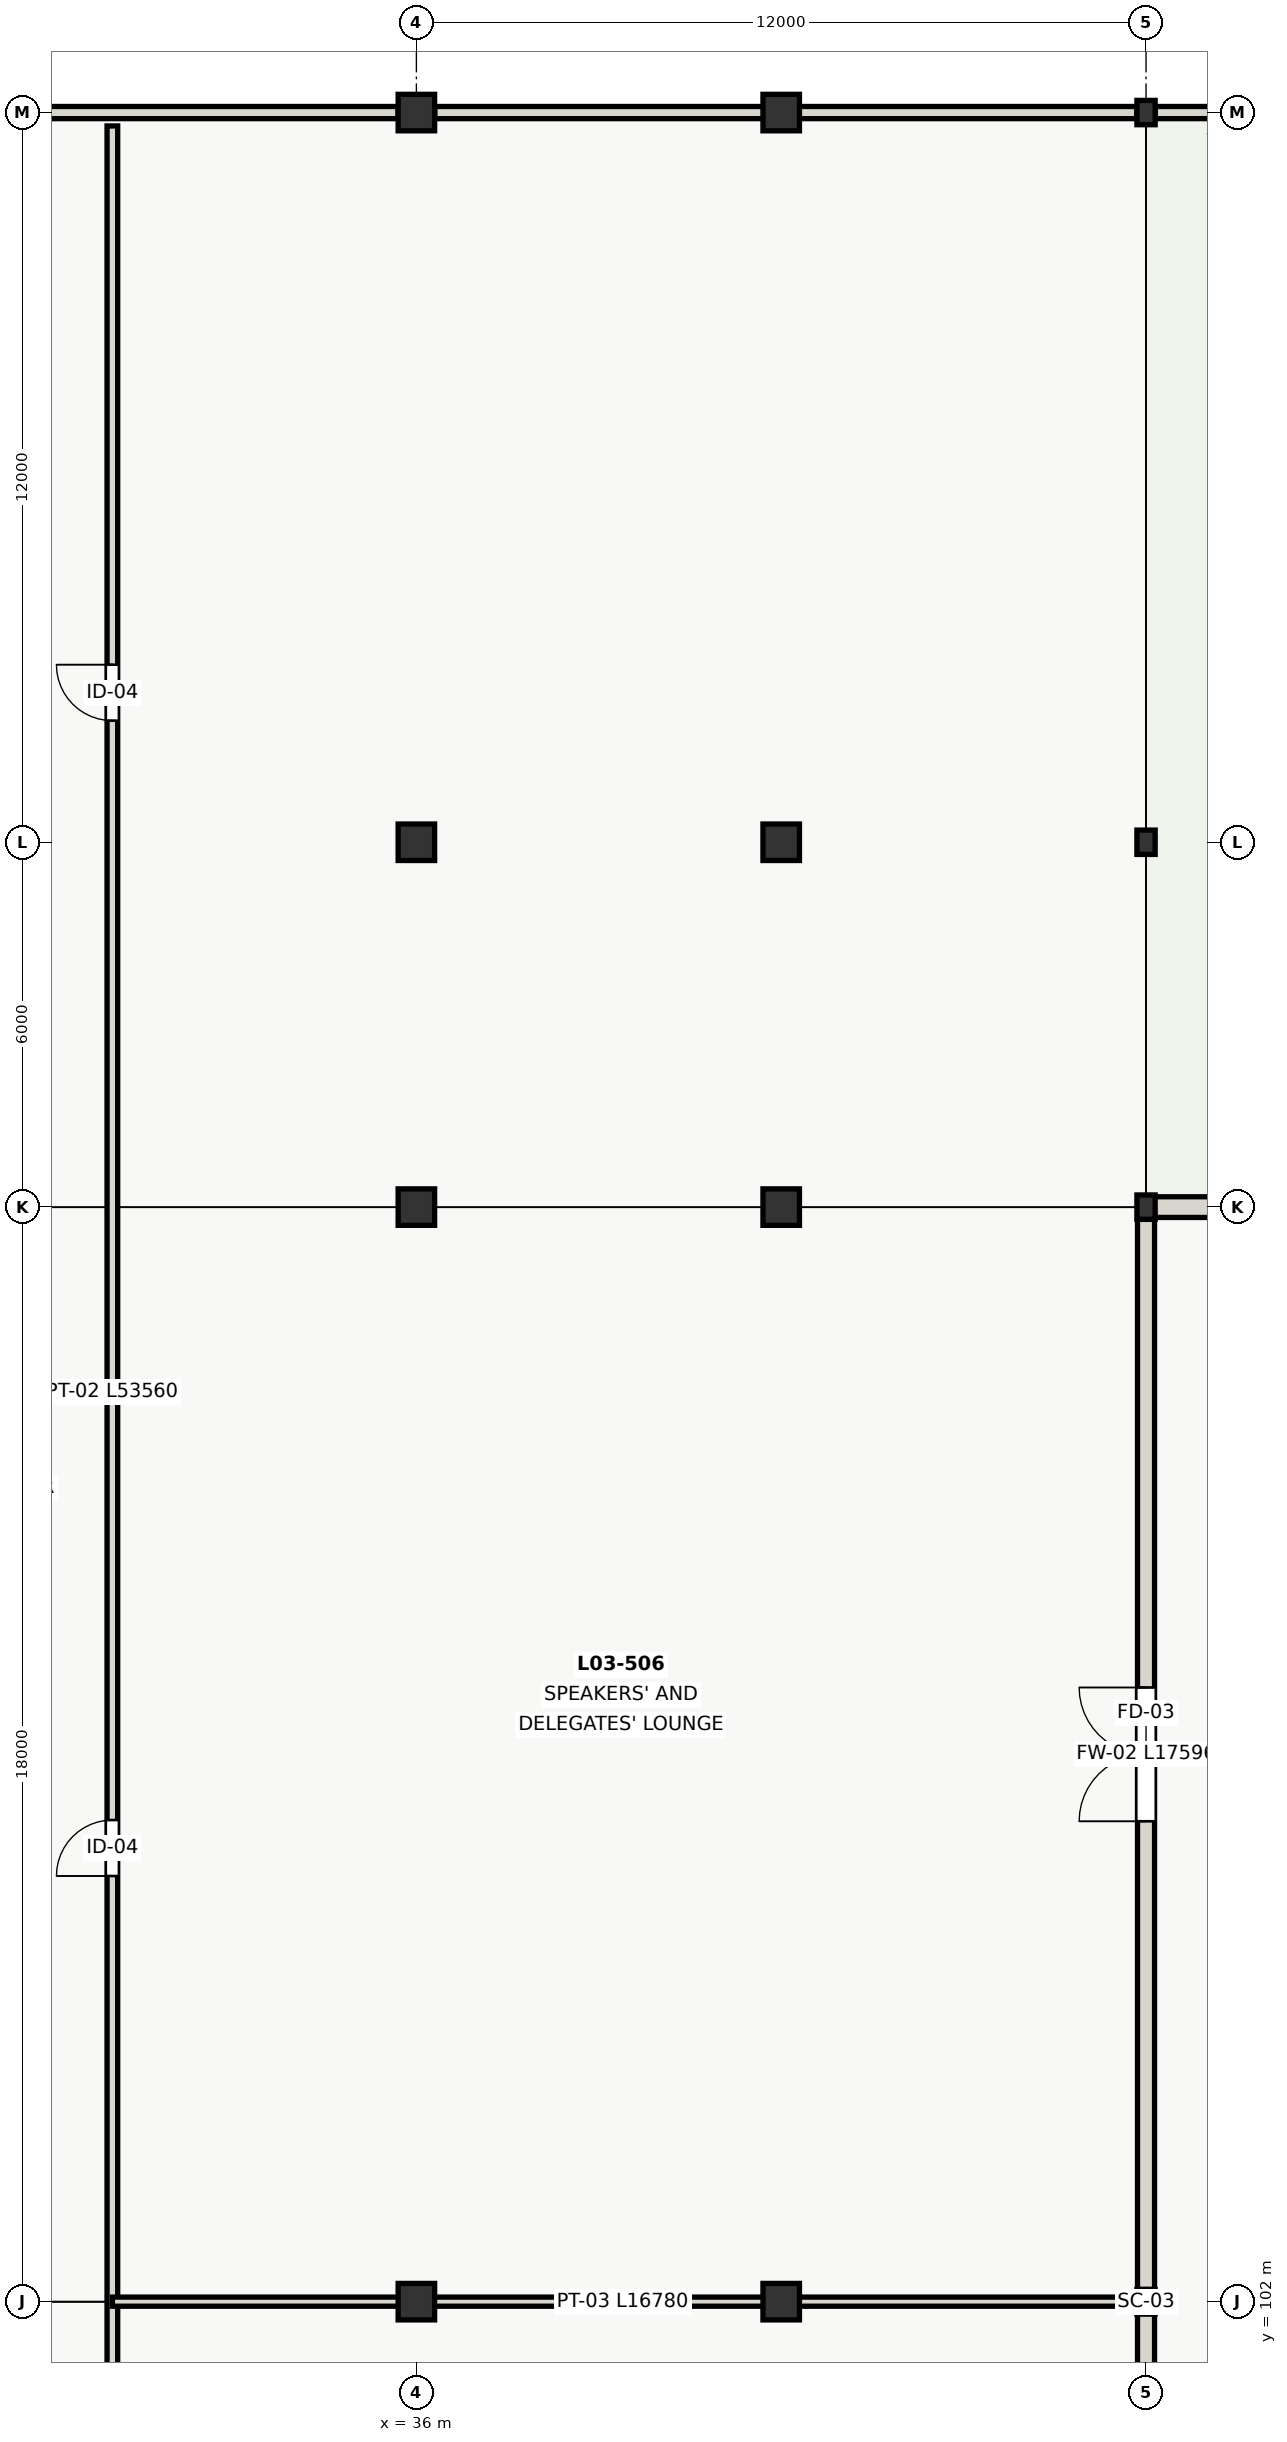
"""IFC4 building model, lengths in metres.
Left out: names, types, materials, properties, quantities, classifications, styles, units other than length and angle.
Written with IfcOpenShell. Run it as: python <this file> out.ifc"""

import sys

from ifc_helpers import new_model, si_unit, direction, frame, frame_2d, origin, origin_2d, place, context, subcontext, project, spatial, rectangle, i_section, extrude, element, fill, save


model = new_model("IFC4")
c1 = context("Model", 3, precision=1e-05, world=origin(), true_north=direction((0.0, 1.0)))
c2 = subcontext(c1, "Body", "Model", "MODEL_VIEW")
j1 = project(units=[si_unit("LENGTHUNIT", "METRE"), si_unit("PLANEANGLEUNIT", "RADIAN")], contexts=[c1])
p1 = place(None, origin())
s1 = spatial("IfcSite", under=j1, at=p1, CompositionType="ELEMENT")
p2 = place(p1, origin())
s2 = spatial("IfcBuilding", under=s1, at=p2, CompositionType="ELEMENT")
p3 = place(p2, frame((0.0, 0.0, 8.4)))
s3 = spatial("IfcBuildingStorey", under=s2, at=p3, CompositionType="ELEMENT", Elevation=8.4)
for number, where, z_axis, x_axis in (
    (1, (36.0, 102.0, 0.0), (0.0, 0.0, 1.0), (1.0, 0.0, 0.0)),
    (2, (42.0, 102.0, 0.0), (0.0, 0.0, 1.0), (1.0, 0.0, 0.0)),
):
    element("IfcColumn", number, at=place(p3, frame(where, z_axis=z_axis, x_axis=x_axis)), inside=s3, PredefinedType="COLUMN", context=c2, shape_type="SweptSolid", body=[
        extrude(rectangle(XDim=0.6, YDim=0.6, at=origin_2d()), origin(), (0.0, 0.0, 1.0), 4.2),
    ])
p4 = place(p3, frame((48.0, 102.0, 0.0), z_axis=(0.0, 0.0, 1.0), x_axis=(1.0, 0.0, 0.0)))
e3 = element("IfcColumn", 3, at=p4, inside=s3, PredefinedType="COLUMN", context=c2, shape_type="SweptSolid", body=[
    extrude(i_section(OverallWidth=0.3, OverallDepth=0.4, WebThickness=0.013, FlangeThickness=0.024, at=origin_2d()), origin(), (0.0, 0.0, 1.0), 4.2),
])
for number, where, z_axis, x_axis in (
    (4, (36.0, 120.0, 0.0), (0.0, 0.0, 1.0), (1.0, 0.0, 0.0)),
    (5, (42.0, 120.0, 0.0), (0.0, 0.0, 1.0), (1.0, 0.0, 0.0)),
):
    element("IfcColumn", number, at=place(p3, frame(where, z_axis=z_axis, x_axis=x_axis)), inside=s3, PredefinedType="COLUMN", context=c2, shape_type="SweptSolid", body=[
        extrude(rectangle(XDim=0.6, YDim=0.6, at=origin_2d()), origin(), (0.0, 0.0, 1.0), 4.2),
    ])
p5 = place(p3, frame((48.0, 120.0, 0.0), z_axis=(0.0, 0.0, 1.0), x_axis=(1.0, 0.0, 0.0)))
e6 = element("IfcColumn", 6, at=p5, inside=s3, PredefinedType="COLUMN", context=c2, shape_type="SweptSolid", body=[
    extrude(i_section(OverallWidth=0.3, OverallDepth=0.4, WebThickness=0.013, FlangeThickness=0.024, at=origin_2d()), origin(), (0.0, 0.0, 1.0), 4.2),
])
for number, where, z_axis, x_axis in (
    (7, (36.0, 126.0, 0.0), (0.0, 0.0, 1.0), (1.0, 0.0, 0.0)),
    (8, (42.0, 126.0, 0.0), (0.0, 0.0, 1.0), (1.0, 0.0, 0.0)),
):
    element("IfcColumn", number, at=place(p3, frame(where, z_axis=z_axis, x_axis=x_axis)), inside=s3, PredefinedType="COLUMN", context=c2, shape_type="SweptSolid", body=[
        extrude(rectangle(XDim=0.6, YDim=0.6, at=origin_2d()), origin(), (0.0, 0.0, 1.0), 4.2),
    ])
p6 = place(p3, frame((48.0, 126.0, 0.0), z_axis=(0.0, 0.0, 1.0), x_axis=(1.0, 0.0, 0.0)))
e9 = element("IfcColumn", 9, at=p6, inside=s3, PredefinedType="COLUMN", context=c2, shape_type="SweptSolid", body=[
    extrude(i_section(OverallWidth=0.3, OverallDepth=0.4, WebThickness=0.013, FlangeThickness=0.024, at=origin_2d()), origin(), (0.0, 0.0, 1.0), 4.2),
])
for number, where, z_axis, x_axis in (
    (10, (36.0, 138.0, 0.0), (0.0, 0.0, 1.0), (1.0, 0.0, 0.0)),
    (11, (42.0, 138.0, 0.0), (0.0, 0.0, 1.0), (1.0, 0.0, 0.0)),
):
    element("IfcColumn", number, at=place(p3, frame(where, z_axis=z_axis, x_axis=x_axis)), inside=s3, PredefinedType="COLUMN", context=c2, shape_type="SweptSolid", body=[
        extrude(rectangle(XDim=0.6, YDim=0.6, at=origin_2d()), origin(), (0.0, 0.0, 1.0), 4.2),
    ])
p7 = place(p3, frame((48.0, 138.0, 0.0), z_axis=(0.0, 0.0, 1.0), x_axis=(1.0, 0.0, 0.0)))
e12 = element("IfcColumn", 12, at=p7, inside=s3, PredefinedType="COLUMN", context=c2, shape_type="SweptSolid", body=[
    extrude(i_section(OverallWidth=0.3, OverallDepth=0.4, WebThickness=0.013, FlangeThickness=0.024, at=origin_2d()), origin(), (0.0, 0.0, 1.0), 4.2),
])
p8 = place(p3, frame((48.0, 120.0, 0.0), z_axis=(0.0, 0.0, 1.0), x_axis=(1.0, 0.0, 0.0)))
e13 = element("IfcWall", 13, at=p8, inside=s3, PredefinedType="SOLIDWALL", context=c2, shape_type="SweptSolid", body=[
    extrude(rectangle(XDim=10.0, YDim=0.34, at=frame_2d((5.0, 0.0))), origin(), (0.0, 0.0, 1.0), 4.2),
])
p9 = place(p8, frame((1.9, 0.0, 0.0)))
e14 = element("IfcOpeningElement", 14, at=p9, cuts=e13, PredefinedType="OPENING", context=c2, shape_type="SweptSolid", body=[
    extrude(rectangle(XDim=1.8, YDim=2.2, at=frame_2d((0.9, 1.1))), frame((0.0, 0.18, 0.0), z_axis=(0.0, -1.0, 0.0), x_axis=(1.0, 0.0, 0.0)), (0.0, 0.0, 1.0), 0.36),
])
p10 = place(p8, frame((6.3, 0.0, 0.0)))
e15 = element("IfcOpeningElement", 15, at=p10, cuts=e13, PredefinedType="OPENING", context=c2, shape_type="SweptSolid", body=[
    extrude(rectangle(XDim=1.8, YDim=2.2, at=frame_2d((0.9, 1.1))), frame((0.0, 0.18, 0.0), z_axis=(0.0, -1.0, 0.0), x_axis=(1.0, 0.0, 0.0)), (0.0, 0.0, 1.0), 0.36),
])
p11 = place(p3, frame((48.0, 84.202, 0.0), z_axis=(0.0, 0.0, 1.0), x_axis=(0.0, 1.0, 0.0)))
e16 = element("IfcWall", 16, at=p11, inside=s3, PredefinedType="SHEAR", context=c2, shape_type="SweptSolid", body=[
    extrude(rectangle(XDim=17.596, YDim=0.28, at=frame_2d((8.798, 0.0))), origin(), (0.0, 0.0, 1.0), 3.8),
])
p12 = place(p11, frame((7.698, 0.0, 0.0)))
e17 = element("IfcOpeningElement", 17, at=p12, cuts=e16, PredefinedType="OPENING", context=c2, shape_type="SweptSolid", body=[
    extrude(rectangle(XDim=2.2, YDim=2.3, at=frame_2d((1.1, 1.15))), frame((0.0, 0.15, 0.0), z_axis=(0.0, -1.0, 0.0), x_axis=(1.0, 0.0, 0.0)), (0.0, 0.0, 1.0), 0.3),
])
p13 = place(p3, frame((48.0, 102.202, 0.0), z_axis=(0.0, 0.0, 1.0), x_axis=(0.0, 1.0, 0.0)))
e18 = element("IfcWall", 18, at=p13, inside=s3, PredefinedType="SHEAR", context=c2, shape_type="SweptSolid", body=[
    extrude(rectangle(XDim=17.596, YDim=0.28, at=frame_2d((8.798, 0.0))), origin(), (0.0, 0.0, 1.0), 3.8),
])
p14 = place(p13, frame((7.698, 0.0, 0.0)))
e19 = element("IfcOpeningElement", 19, at=p14, cuts=e18, PredefinedType="OPENING", context=c2, shape_type="SweptSolid", body=[
    extrude(rectangle(XDim=2.2, YDim=2.3, at=frame_2d((1.1, 1.15))), frame((0.0, 0.15, 0.0), z_axis=(0.0, -1.0, 0.0), x_axis=(1.0, 0.0, 0.0)), (0.0, 0.0, 1.0), 0.3),
])
p15 = place(p3, frame((24.302, 138.0, 0.0), z_axis=(0.0, 0.0, 1.0), x_axis=(1.0, 0.0, 0.0)))
e20 = element("IfcWall", 20, at=p15, inside=s3, PredefinedType="PARTITIONING", context=c2, shape_type="SweptSolid", body=[
    extrude(rectangle(XDim=11.396, YDim=0.2, at=frame_2d((5.698, 0.0))), origin(), (0.0, 0.0, 1.0), 3.57),
])
p16 = place(p3, frame((36.302, 138.0, 0.0), z_axis=(0.0, 0.0, 1.0), x_axis=(1.0, 0.0, 0.0)))
e21 = element("IfcWall", 21, at=p16, inside=s3, PredefinedType="PARTITIONING", context=c2, shape_type="SweptSolid", body=[
    extrude(rectangle(XDim=11.546, YDim=0.2, at=frame_2d((5.773, 0.0))), origin(), (0.0, 0.0, 1.0), 3.57),
])
p17 = place(p3, frame((48.152, 138.0, 0.0), z_axis=(0.0, 0.0, 1.0), x_axis=(1.0, 0.0, 0.0)))
e22 = element("IfcWall", 22, at=p17, inside=s3, PredefinedType="PARTITIONING", context=c2, shape_type="SweptSolid", body=[
    extrude(rectangle(XDim=11.696, YDim=0.2, at=frame_2d((5.848, 0.0))), origin(), (0.0, 0.0, 1.0), 3.57),
])
p18 = place(p3, frame((31.0, 84.22, 0.0), z_axis=(0.0, 0.0, 1.0), x_axis=(0.0, 1.0, 0.0)))
e23 = element("IfcWall", 23, at=p18, inside=s3, PredefinedType="PARTITIONING", context=c2, shape_type="SweptSolid", body=[
    extrude(rectangle(XDim=53.56, YDim=0.175, at=frame_2d((26.78, 0.0))), origin(), (0.0, 0.0, 1.0), 3.75),
])
p19 = place(p18, frame((7.78, 0.0, 0.0)))
e24 = element("IfcOpeningElement", 24, at=p19, cuts=e23, PredefinedType="OPENING", context=c2, shape_type="SweptSolid", body=[
    extrude(rectangle(XDim=0.98, YDim=2.1, at=frame_2d((0.49, 1.05))), frame((0.0, 0.097, 0.0), z_axis=(0.0, -1.0, 0.0), x_axis=(1.0, 0.0, 0.0)), (0.0, 0.0, 1.0), 0.195),
])
p20 = place(p18, frame((24.78, 0.0, 0.0)))
e25 = element("IfcOpeningElement", 25, at=p20, cuts=e23, PredefinedType="OPENING", context=c2, shape_type="SweptSolid", body=[
    extrude(rectangle(XDim=0.92, YDim=2.05, at=frame_2d((0.46, 1.025))), frame((0.0, 0.097, 0.0), z_axis=(0.0, -1.0, 0.0), x_axis=(1.0, 0.0, 0.0)), (0.0, 0.0, 1.0), 0.195),
])
p21 = place(p18, frame((43.78, 0.0, 0.0)))
e26 = element("IfcOpeningElement", 26, at=p21, cuts=e23, PredefinedType="OPENING", context=c2, shape_type="SweptSolid", body=[
    extrude(rectangle(XDim=0.92, YDim=2.05, at=frame_2d((0.46, 1.025))), frame((0.0, 0.097, 0.0), z_axis=(0.0, -1.0, 0.0), x_axis=(1.0, 0.0, 0.0)), (0.0, 0.0, 1.0), 0.195),
])
p22 = place(p3, frame((31.0, 102.0, 0.0), z_axis=(0.0, 0.0, 1.0), x_axis=(1.0, 0.0, 0.0)))
e27 = element("IfcWall", 27, at=p22, inside=s3, PredefinedType="PARTITIONING", context=c2, shape_type="SweptSolid", body=[
    extrude(rectangle(XDim=16.78, YDim=0.15, at=frame_2d((8.39, 0.0))), origin(), (0.0, 0.0, 1.0), 3.42),
])
p23 = place(p14, origin())
e28 = element("IfcDoor", 28, at=p23, inside=s3, OperationType="DOUBLE_DOOR_SINGLE_SWING", PredefinedType="DOOR", context=c2, shape_type="SweptSolid", body=[
    extrude(rectangle(XDim=2.2, YDim=2.3, at=frame_2d((1.1, 1.15))), frame((0.0, 0.025, 0.0), z_axis=(0.0, -1.0, 0.0), x_axis=(1.0, 0.0, 0.0)), (0.0, 0.0, 1.0), 0.05),
])
fill(e19, e28)
p24 = place(p20, origin())
e29 = element("IfcDoor", 29, at=p24, inside=s3, OperationType="SINGLE_SWING_LEFT", PredefinedType="DOOR", context=c2, shape_type="SweptSolid", body=[
    extrude(rectangle(XDim=0.92, YDim=2.05, at=frame_2d((0.46, 1.025))), frame((0.0, 0.025, 0.0), z_axis=(0.0, -1.0, 0.0), x_axis=(1.0, 0.0, 0.0)), (0.0, 0.0, 1.0), 0.05),
])
fill(e25, e29)
p25 = place(p21, origin())
e30 = element("IfcDoor", 30, at=p25, inside=s3, OperationType="SINGLE_SWING_RIGHT", PredefinedType="DOOR", context=c2, shape_type="SweptSolid", body=[
    extrude(rectangle(XDim=0.92, YDim=2.05, at=frame_2d((0.46, 1.025))), frame((0.0, 0.025, 0.0), z_axis=(0.0, -1.0, 0.0), x_axis=(1.0, 0.0, 0.0)), (0.0, 0.0, 1.0), 0.05),
])
fill(e26, e30)
save(model, sys.argv[1])
